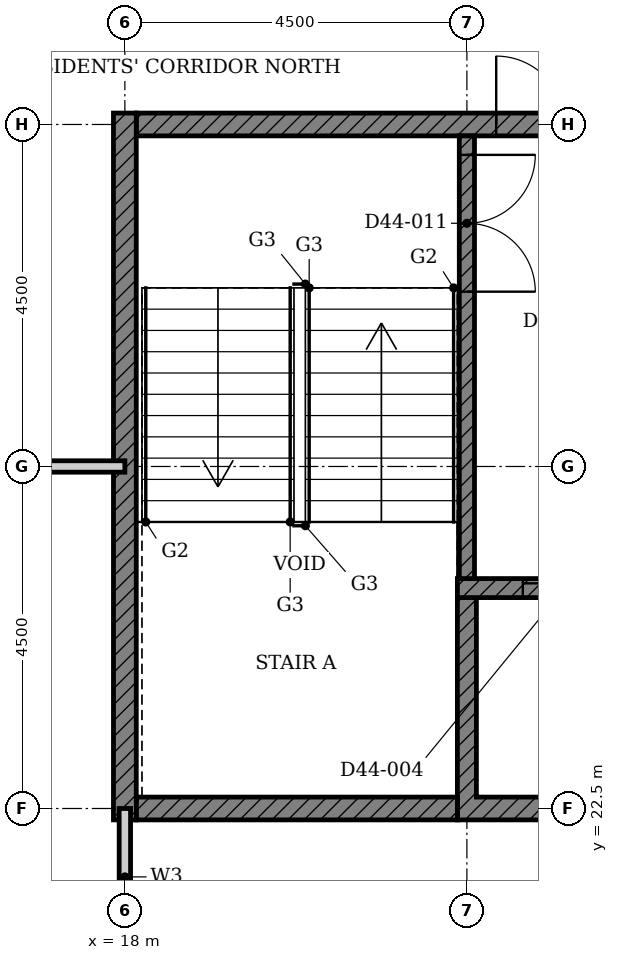
"""IFC4 building model, lengths in metres.
Left out: names, types, materials, properties, quantities, classifications, styles, units other than length and angle.
Written with IfcOpenShell. Run it as: python <this file> out.ifc"""

import sys

from ifc_helpers import new_model, si_unit, direction, frame, frame_2d, origin, place, context, subcontext, project, spatial, polyline, rectangle, outline, extrude, element, fill, save


model = new_model("IFC4")
c1 = context("Model", 3, precision=1e-05, world=origin(), true_north=direction((0.0, 1.0)))
c2 = subcontext(c1, "Body", "Model", "MODEL_VIEW")
j1 = project(units=[si_unit("LENGTHUNIT", "METRE"), si_unit("PLANEANGLEUNIT", "RADIAN")], contexts=[c1])
p1 = place(None, origin())
s1 = spatial("IfcSite", under=j1, at=p1, CompositionType="ELEMENT")
p2 = place(p1, origin())
s2 = spatial("IfcBuilding", under=s1, at=p2, CompositionType="ELEMENT")
p3 = place(p2, frame((0.0, 0.0, 176.5)))
s3 = spatial("IfcBuildingStorey", under=s2, at=p3, CompositionType="ELEMENT", Elevation=176.5)
p4 = place(p3, origin())
e1 = element("IfcWall", 1, at=p4, inside=s3, PredefinedType="SHEAR", context=c2, shape_type="SweptSolid", body=[
    extrude(outline(polyline([(22.375, 22.35), (25.197, 22.35), (25.197, 25.275), (24.947, 25.275), (24.947, 22.65), (22.625, 22.65), (22.625, 25.275), (22.375, 25.275), (22.375, 22.35)])), origin(), (0.0, 0.0, 1.0), 3.4),
])
p5 = place(p3, frame((18.15, 22.5, 0.0), z_axis=(0.0, 0.0, 1.0), x_axis=(1.0, 0.0, 0.0)))
e2 = element("IfcWall", 2, at=p5, inside=s3, PredefinedType="SHEAR", context=c2, shape_type="SweptSolid", body=[
    extrude(rectangle(XDim=4.225, YDim=0.3, at=frame_2d((2.113, 0.0))), origin(), (0.0, 0.0, 1.0), 3.4),
])
p6 = place(p3, frame((18.15, 31.5, 0.0), z_axis=(0.0, 0.0, 1.0), x_axis=(1.0, 0.0, 0.0)))
e3 = element("IfcWall", 3, at=p6, inside=s3, PredefinedType="SHEAR", context=c2, shape_type="SweptSolid", body=[
    extrude(rectangle(XDim=9.368, YDim=0.3, at=frame_2d((4.684, 0.0))), origin(), (0.0, 0.0, 1.0), 3.4),
])
p7 = place(p6, frame((4.736, 0.0, 0.0)))
e4 = element("IfcOpeningElement", 4, at=p7, cuts=e3, PredefinedType="OPENING", context=c2, shape_type="SweptSolid", body=[
    extrude(rectangle(XDim=1.8, YDim=2.1, at=frame_2d((0.9, 1.05))), frame((0.0, 0.16, 0.0), z_axis=(0.0, -1.0, 0.0), x_axis=(1.0, 0.0, 0.0)), (0.0, 0.0, 1.0), 0.32),
])
p8 = place(p3, frame((18.0, 22.35, 0.0), z_axis=(0.0, 0.0, 1.0), x_axis=(0.0, 1.0, 0.0)))
e5 = element("IfcWall", 5, at=p8, inside=s3, PredefinedType="SHEAR", context=c2, shape_type="SweptSolid", body=[
    extrude(rectangle(XDim=9.3, YDim=0.3, at=frame_2d((4.65, 0.0))), origin(), (0.0, 0.0, 1.0), 3.4),
])
p9 = place(p3, frame((22.375, 25.4, 0.0), z_axis=(0.0, 0.0, 1.0), x_axis=(1.0, 0.0, 0.0)))
e6 = element("IfcWall", 6, at=p9, inside=s3, PredefinedType="SHEAR", context=c2, shape_type="SweptSolid", body=[
    extrude(rectangle(XDim=15.678, YDim=0.25, at=frame_2d((7.839, 0.0))), origin(), (0.0, 0.0, 1.0), 3.4),
])
p10 = place(p9, frame((8.575, 0.0, 0.0)))
e7 = element("IfcOpeningElement", 7, at=p10, cuts=e6, PredefinedType="OPENING", context=c2, shape_type="SweptSolid", body=[
    extrude(rectangle(XDim=1.1, YDim=2.1, at=frame_2d((0.55, 1.05))), frame((0.0, 0.135, 0.0), z_axis=(0.0, -1.0, 0.0), x_axis=(1.0, 0.0, 0.0)), (0.0, 0.0, 1.0), 0.27),
])
p11 = place(p9, frame((0.861, 0.0, 0.0)))
e8 = element("IfcOpeningElement", 8, at=p11, cuts=e6, PredefinedType="OPENING", context=c2, shape_type="SweptSolid", body=[
    extrude(rectangle(XDim=1.1, YDim=2.1, at=frame_2d((0.55, 1.05))), frame((0.0, 0.135, 0.0), z_axis=(0.0, -1.0, 0.0), x_axis=(1.0, 0.0, 0.0)), (0.0, 0.0, 1.0), 0.27),
])
p12 = place(p9, frame((3.532, 0.0, 0.0)))
e9 = element("IfcOpeningElement", 9, at=p12, cuts=e6, PredefinedType="OPENING", context=c2, shape_type="SweptSolid", body=[
    extrude(rectangle(XDim=0.9, YDim=2.1, at=frame_2d((0.45, 1.05))), frame((0.0, 0.135, 0.0), z_axis=(0.0, -1.0, 0.0), x_axis=(1.0, 0.0, 0.0)), (0.0, 0.0, 1.0), 0.27),
])
p13 = place(p9, frame((11.246, 0.0, 0.0)))
e10 = element("IfcOpeningElement", 10, at=p13, cuts=e6, PredefinedType="OPENING", context=c2, shape_type="SweptSolid", body=[
    extrude(rectangle(XDim=0.9, YDim=2.1, at=frame_2d((0.45, 1.05))), frame((0.0, 0.135, 0.0), z_axis=(0.0, -1.0, 0.0), x_axis=(1.0, 0.0, 0.0)), (0.0, 0.0, 1.0), 0.27),
])
p14 = place(p9, frame((13.818, 0.0, 0.0)))
e11 = element("IfcOpeningElement", 11, at=p14, cuts=e6, PredefinedType="OPENING", context=c2, shape_type="SweptSolid", body=[
    extrude(rectangle(XDim=0.9, YDim=2.1, at=frame_2d((0.45, 1.05))), frame((0.0, 0.135, 0.0), z_axis=(0.0, -1.0, 0.0), x_axis=(1.0, 0.0, 0.0)), (0.0, 0.0, 1.0), 0.27),
])
p15 = place(p3, frame((22.5, 31.35, 0.0), z_axis=(0.0, 0.0, 1.0), x_axis=(0.0, -1.0, 0.0)))
e12 = element("IfcWall", 12, at=p15, inside=s3, PredefinedType="SHEAR", context=c2, shape_type="SweptSolid", body=[
    extrude(rectangle(XDim=5.825, YDim=0.2, at=frame_2d((2.913, 0.0))), origin(), (0.0, 0.0, 1.0), 3.4),
])
p16 = place(p15, frame((0.25, 0.0, 0.0)))
e13 = element("IfcOpeningElement", 13, at=p16, cuts=e12, PredefinedType="OPENING", context=c2, shape_type="SweptSolid", body=[
    extrude(rectangle(XDim=1.8, YDim=2.1, at=frame_2d((0.9, 1.05))), frame((0.0, 0.11, 0.0), z_axis=(0.0, -1.0, 0.0), x_axis=(1.0, 0.0, 0.0)), (0.0, 0.0, 1.0), 0.22),
])
p17 = place(p3, frame((4.5, 27.0, 0.0), z_axis=(0.0, 0.0, 1.0), x_axis=(1.0, 0.0, 0.0)))
e14 = element("IfcWall", 14, at=p17, inside=s3, PredefinedType="PARTITIONING", context=c2, shape_type="SweptSolid", body=[
    extrude(rectangle(XDim=13.5, YDim=0.15, at=frame_2d((6.75, 0.0))), origin(), (0.0, 0.0, 1.0), 2.68),
])
p18 = place(p17, frame((5.35, 0.0, 0.0)))
e15 = element("IfcOpeningElement", 15, at=p18, cuts=e14, PredefinedType="OPENING", context=c2, shape_type="SweptSolid", body=[
    extrude(rectangle(XDim=1.0, YDim=2.1, at=frame_2d((0.5, 1.05))), frame((0.0, 0.085, 0.0), z_axis=(0.0, -1.0, 0.0), x_axis=(1.0, 0.0, 0.0)), (0.0, 0.0, 1.0), 0.17),
])
p19 = place(p3, frame((18.0, 20.7, 0.0), z_axis=(0.0, 0.0, 1.0), x_axis=(0.0, 1.0, 0.0)))
e16 = element("IfcWall", 16, at=p19, inside=s3, PredefinedType="PARTITIONING", context=c2, shape_type="SweptSolid", body=[
    extrude(rectangle(XDim=1.8, YDim=0.15, at=frame_2d((0.9, 0.0))), origin(), (0.0, 0.0, 1.0), 3.4),
])
p20 = place(p11, origin())
e17 = element("IfcDoor", 17, at=p20, inside=s3, OperationType="DOUBLE_DOOR_SLIDING", PredefinedType="DOOR", context=c2, shape_type="SweptSolid", body=[
    extrude(rectangle(XDim=1.1, YDim=2.1, at=frame_2d((0.55, 1.05))), frame((0.0, 0.025, 0.0), z_axis=(0.0, -1.0, 0.0), x_axis=(1.0, 0.0, 0.0)), (0.0, 0.0, 1.0), 0.05),
])
fill(e8, e17)
p21 = place(p16, origin())
e18 = element("IfcDoor", 18, at=p21, inside=s3, OperationType="DOUBLE_DOOR_SINGLE_SWING", PredefinedType="DOOR", context=c2, shape_type="SweptSolid", body=[
    extrude(rectangle(XDim=1.8, YDim=2.1, at=frame_2d((0.9, 1.05))), frame((0.0, 0.025, 0.0), z_axis=(0.0, -1.0, 0.0), x_axis=(1.0, 0.0, 0.0)), (0.0, 0.0, 1.0), 0.05),
])
fill(e13, e18)
p22 = place(p7, origin())
e19 = element("IfcDoor", 19, at=p22, inside=s3, OperationType="DOUBLE_DOOR_SINGLE_SWING", PredefinedType="DOOR", context=c2, shape_type="SweptSolid", body=[
    extrude(rectangle(XDim=1.8, YDim=2.1, at=frame_2d((0.9, 1.05))), frame((0.0, 0.025, 0.0), z_axis=(0.0, -1.0, 0.0), x_axis=(1.0, 0.0, 0.0)), (0.0, 0.0, 1.0), 0.05),
])
fill(e4, e19)
save(model, sys.argv[1])
